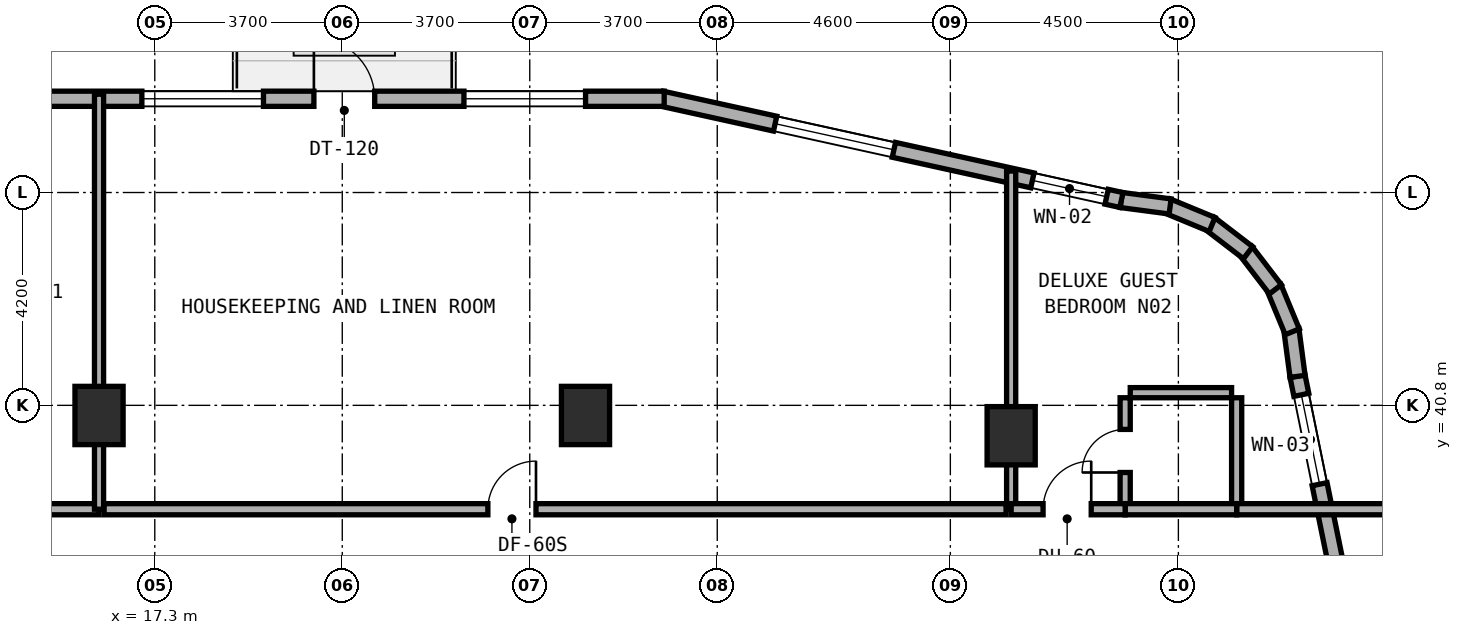
"""IFC4 building model, lengths in metres.
Left out: names, types, materials, properties, quantities, classifications, styles, units other than length and angle.
Written with IfcOpenShell. Run it as: python <this file> out.ifc"""

import sys

from ifc_helpers import new_model, si_unit, direction, frame, frame_2d, origin, origin_2d, place, context, subcontext, project, spatial, rectangle, extrude, element, fill, save


model = new_model("IFC4")
c1 = context("Model", 3, precision=1e-05, world=origin(), true_north=direction((0.0, 1.0)))
c2 = subcontext(c1, "Body", "Model", "MODEL_VIEW")
j1 = project(units=[si_unit("LENGTHUNIT", "METRE"), si_unit("PLANEANGLEUNIT", "RADIAN")], contexts=[c1])
p1 = place(None, origin())
s1 = spatial("IfcSite", under=j1, at=p1, CompositionType="ELEMENT")
p2 = place(p1, origin())
s2 = spatial("IfcBuilding", under=s1, at=p2, CompositionType="ELEMENT")
p3 = place(p2, frame((0.0, 0.0, 59.0)))
s3 = spatial("IfcBuildingStorey", under=s2, at=p3, CompositionType="ELEMENT", Elevation=59.0)
for number, where, z_axis, x_axis in (
    (1, (16.2, 40.6, 0.0), (0.0, 0.0, 1.0), (1.0, 0.0, 0.0)),
    (2, (25.8, 40.6, 0.0), (0.0, 0.0, 1.0), (1.0, 0.0, 0.0)),
    (3, (34.2, 40.2, 0.0), (0.0, 0.0, 1.0), (1.0, 0.0, 0.0)),
):
    element("IfcColumn", number, at=place(p3, frame(where, z_axis=z_axis, x_axis=x_axis)), inside=s3, PredefinedType="COLUMN", context=c2, shape_type="SweptSolid", body=[
        extrude(rectangle(XDim=0.95, YDim=1.15, at=origin_2d()), origin(), (0.0, 0.0, 1.0), 3.5),
    ])
p4 = place(p3, frame((41.864, 31.516, 0.0), z_axis=(0.0, 0.0, 1.0), x_axis=(-0.199990901713, 0.979797754249, 0.0)))
e4 = element("IfcWall", 4, at=p4, inside=s3, PredefinedType="STANDARD", context=c2, shape_type="SweptSolid", body=[
    extrude(rectangle(XDim=10.065, YDim=0.3, at=frame_2d((5.033, 0.0))), origin(), (0.0, 0.0, 1.0), 3.22),
])
p5 = place(p4, frame((2.429, 0.0, 0.8)))
e5 = element("IfcOpeningElement", 5, at=p5, cuts=e4, PredefinedType="OPENING", context=c2, shape_type="SweptSolid", body=[
    extrude(rectangle(XDim=2.4, YDim=1.6, at=frame_2d((1.2, 0.8))), frame((0.0, 0.16, 0.0), z_axis=(0.0, -1.0, 0.0), x_axis=(1.0, 0.0, 0.0)), (0.0, 0.0, 1.0), 0.32),
])
p6 = place(p4, frame((7.887, 0.0, 0.85)))
e6 = element("IfcOpeningElement", 6, at=p6, cuts=e4, PredefinedType="OPENING", context=c2, shape_type="SweptSolid", body=[
    extrude(rectangle(XDim=1.8, YDim=1.5, at=frame_2d((0.9, 0.75))), frame((0.0, 0.16, 0.0), z_axis=(0.0, -1.0, 0.0), x_axis=(1.0, 0.0, 0.0)), (0.0, 0.0, 1.0), 0.32),
])
p7 = place(p3, frame((39.852, 41.372, 0.0), z_axis=(0.0, 0.0, 1.0), x_axis=(-0.131174864804, 0.991359246108, 0.0)))
e7 = element("IfcWall", 7, at=p7, inside=s3, PredefinedType="STANDARD", context=c2, shape_type="SweptSolid", body=[
    extrude(rectangle(XDim=0.938, YDim=0.3, at=frame_2d((0.469, 0.0))), origin(), (0.0, 0.0, 1.0), 3.22),
])
p8 = place(p3, frame((39.748, 42.252, 0.0), z_axis=(0.0, 0.0, 1.0), x_axis=(-0.382344263057, 0.924019948111, 0.0)))
e8 = element("IfcWall", 8, at=p8, inside=s3, PredefinedType="STANDARD", context=c2, shape_type="SweptSolid", body=[
    extrude(rectangle(XDim=0.955, YDim=0.3, at=frame_2d((0.477, 0.0))), origin(), (0.0, 0.0, 1.0), 3.22),
])
p9 = place(p3, frame((39.414, 43.089, 0.0), z_axis=(0.0, 0.0, 1.0), x_axis=(-0.608474481025, 0.793573440799, 0.0)))
e9 = element("IfcWall", 9, at=p9, inside=s3, PredefinedType="STANDARD", context=c2, shape_type="SweptSolid", body=[
    extrude(rectangle(XDim=0.955, YDim=0.3, at=frame_2d((0.478, 0.0))), origin(), (0.0, 0.0, 1.0), 3.22),
])
p10 = place(p3, frame((38.875, 43.812, 0.0), z_axis=(0.0, 0.0, 1.0), x_axis=(-0.793668068435, 0.608351047625, 0.0)))
e10 = element("IfcWall", 10, at=p10, inside=s3, PredefinedType="STANDARD", context=c2, shape_type="SweptSolid", body=[
    extrude(rectangle(XDim=0.955, YDim=0.3, at=frame_2d((0.478, 0.0))), origin(), (0.0, 0.0, 1.0), 3.22),
])
p11 = place(p3, frame((38.166, 44.369, 0.0), z_axis=(0.0, 0.0, 1.0), x_axis=(-0.924019948111, 0.382344263057, 0.0)))
e11 = element("IfcWall", 11, at=p11, inside=s3, PredefinedType="STANDARD", context=c2, shape_type="SweptSolid", body=[
    extrude(rectangle(XDim=0.955, YDim=0.3, at=frame_2d((0.477, 0.0))), origin(), (0.0, 0.0, 1.0), 3.22),
])
p12 = place(p3, frame((37.337, 44.725, 0.0), z_axis=(0.0, 0.0, 1.0), x_axis=(-0.991454295543, 0.130454512571, 0.0)))
e12 = element("IfcWall", 12, at=p12, inside=s3, PredefinedType="STANDARD", context=c2, shape_type="SweptSolid", body=[
    extrude(rectangle(XDim=0.973, YDim=0.3, at=frame_2d((0.487, 0.0))), origin(), (0.0, 0.0, 1.0), 3.22),
])
p13 = place(p3, frame((36.376, 44.852, 0.0), z_axis=(0.0, 0.0, 1.0), x_axis=(-0.976540764801, 0.215332614068, 0.0)))
e13 = element("IfcWall", 13, at=p13, inside=s3, PredefinedType="STANDARD", context=c2, shape_type="SweptSolid", body=[
    extrude(rectangle(XDim=9.288, YDim=0.3, at=frame_2d((4.644, 0.0))), origin(), (0.0, 0.0, 1.0), 3.22),
])
p14 = place(p13, frame((0.299, 0.0, 0.85)))
e14 = element("IfcOpeningElement", 14, at=p14, cuts=e13, PredefinedType="OPENING", context=c2, shape_type="SweptSolid", body=[
    extrude(rectangle(XDim=1.5, YDim=1.5, at=frame_2d((0.75, 0.75))), frame((0.0, 0.16, 0.0), z_axis=(0.0, -1.0, 0.0), x_axis=(1.0, 0.0, 0.0)), (0.0, 0.0, 1.0), 0.32),
])
p15 = place(p13, frame((4.598, 0.0, 0.8)))
e15 = element("IfcOpeningElement", 15, at=p15, cuts=e13, PredefinedType="OPENING", context=c2, shape_type="SweptSolid", body=[
    extrude(rectangle(XDim=2.4, YDim=1.6, at=frame_2d((1.2, 0.8))), frame((0.0, 0.16, 0.0), z_axis=(0.0, -1.0, 0.0), x_axis=(1.0, 0.0, 0.0)), (0.0, 0.0, 1.0), 0.32),
])
p16 = place(p3, frame((27.353, 46.85, 0.0), z_axis=(0.0, 0.0, 1.0), x_axis=(-1.0, 0.0, 0.0)))
e16 = element("IfcWall", 16, at=p16, inside=s3, PredefinedType="STANDARD", context=c2, shape_type="SweptSolid", body=[
    extrude(rectangle(XDim=12.591, YDim=0.3, at=frame_2d((6.295, 0.0))), origin(), (0.0, 0.0, 1.0), 3.22),
])
p17 = place(p16, frame((5.713, 0.0, 0.0)))
e17 = element("IfcOpeningElement", 17, at=p17, cuts=e16, PredefinedType="OPENING", context=c2, shape_type="SweptSolid", body=[
    extrude(rectangle(XDim=1.2, YDim=2.15, at=frame_2d((0.6, 1.075))), frame((0.0, 0.16, 0.0), z_axis=(0.0, -1.0, 0.0), x_axis=(1.0, 0.0, 0.0)), (0.0, 0.0, 1.0), 0.32),
])
p18 = place(p16, frame((1.552, 0.0, 0.8)))
e18 = element("IfcOpeningElement", 18, at=p18, cuts=e16, PredefinedType="OPENING", context=c2, shape_type="SweptSolid", body=[
    extrude(rectangle(XDim=2.4, YDim=1.6, at=frame_2d((1.2, 0.8))), frame((0.0, 0.16, 0.0), z_axis=(0.0, -1.0, 0.0), x_axis=(1.0, 0.0, 0.0)), (0.0, 0.0, 1.0), 0.32),
])
p19 = place(p16, frame((7.908, 0.0, 0.8)))
e19 = element("IfcOpeningElement", 19, at=p19, cuts=e16, PredefinedType="OPENING", context=c2, shape_type="SweptSolid", body=[
    extrude(rectangle(XDim=2.4, YDim=1.6, at=frame_2d((1.2, 0.8))), frame((0.0, 0.16, 0.0), z_axis=(0.0, -1.0, 0.0), x_axis=(1.0, 0.0, 0.0)), (0.0, 0.0, 1.0), 0.32),
])
p20 = place(p3, frame((5.55, 38.75, 0.0), z_axis=(0.0, 0.0, 1.0), x_axis=(1.0, 0.0, 0.0)))
e20 = element("IfcWall", 20, at=p20, inside=s3, PredefinedType="SOLIDWALL", context=c2, shape_type="SweptSolid", body=[
    extrude(rectangle(XDim=10.65, YDim=0.22, at=frame_2d((5.325, 0.0))), origin(), (0.0, 0.0, 1.0), 2.495),
])
p21 = place(p20, frame((4.85, 0.0, 0.0)))
e21 = element("IfcOpeningElement", 21, at=p21, cuts=e20, PredefinedType="OPENING", context=c2, shape_type="SweptSolid", body=[
    extrude(rectangle(XDim=0.95, YDim=2.1, at=frame_2d((0.475, 1.05))), frame((0.0, 0.12, 0.0), z_axis=(0.0, -1.0, 0.0), x_axis=(1.0, 0.0, 0.0)), (0.0, 0.0, 1.0), 0.24),
])
p22 = place(p3, frame((16.2, 38.75, 0.0), z_axis=(0.0, 0.0, 1.0), x_axis=(0.0, 1.0, 0.0)))
e22 = element("IfcWall", 22, at=p22, inside=s3, PredefinedType="SOLIDWALL", context=c2, shape_type="SweptSolid", body=[
    extrude(rectangle(XDim=8.19, YDim=0.18, at=frame_2d((4.095, 0.0))), origin(), (0.0, 0.0, 1.0), 2.495),
])
p23 = place(p3, frame((16.3, 38.75, 0.0), z_axis=(0.0, 0.0, 1.0), x_axis=(1.0, 0.0, 0.0)))
e23 = element("IfcWall", 23, at=p23, inside=s3, PredefinedType="SOLIDWALL", context=c2, shape_type="SweptSolid", body=[
    extrude(rectangle(XDim=17.8, YDim=0.22, at=frame_2d((8.9, 0.0))), origin(), (0.0, 0.0, 1.0), 2.495),
])
p24 = place(p23, frame((7.573, 0.0, 0.0)))
e24 = element("IfcOpeningElement", 24, at=p24, cuts=e23, PredefinedType="OPENING", context=c2, shape_type="SweptSolid", body=[
    extrude(rectangle(XDim=0.95, YDim=2.1, at=frame_2d((0.475, 1.05))), frame((0.0, 0.12, 0.0), z_axis=(0.0, -1.0, 0.0), x_axis=(1.0, 0.0, 0.0)), (0.0, 0.0, 1.0), 0.24),
])
p25 = place(p3, frame((34.2, 38.75, 0.0), z_axis=(0.0, 0.0, 1.0), x_axis=(0.0, 1.0, 0.0)))
e25 = element("IfcWall", 25, at=p25, inside=s3, PredefinedType="SOLIDWALL", context=c2, shape_type="SweptSolid", body=[
    extrude(rectangle(XDim=6.674, YDim=0.18, at=frame_2d((3.337, 0.0))), origin(), (0.0, 0.0, 1.0), 2.495),
])
p26 = place(p3, frame((36.45, 38.85, 0.0), z_axis=(0.0, 0.0, 1.0), x_axis=(0.0, 1.0, 0.0)))
e26 = element("IfcWall", 26, at=p26, inside=s3, PredefinedType="PLUMBINGWALL", context=c2, shape_type="SweptSolid", body=[
    extrude(rectangle(XDim=2.1, YDim=0.2, at=frame_2d((1.05, 0.0))), origin(), (0.0, 0.0, 1.0), 3.22),
])
p27 = place(p26, frame((0.625, 0.0, 0.0)))
e27 = element("IfcOpeningElement", 27, at=p27, cuts=e26, PredefinedType="OPENING", context=c2, shape_type="SweptSolid", body=[
    extrude(rectangle(XDim=0.85, YDim=2.1, at=frame_2d((0.425, 1.05))), frame((0.0, 0.11, 0.0), z_axis=(0.0, -1.0, 0.0), x_axis=(1.0, 0.0, 0.0)), (0.0, 0.0, 1.0), 0.22),
])
p28 = place(p3, frame((36.55, 41.05, 0.0), z_axis=(0.0, 0.0, 1.0), x_axis=(1.0, 0.0, 0.0)))
e28 = element("IfcWall", 28, at=p28, inside=s3, PredefinedType="PLUMBINGWALL", context=c2, shape_type="SweptSolid", body=[
    extrude(rectangle(XDim=2.0, YDim=0.2, at=frame_2d((1.0, 0.0))), origin(), (0.0, 0.0, 1.0), 3.22),
])
p29 = place(p3, frame((38.65, 38.85, 0.0), z_axis=(0.0, 0.0, 1.0), x_axis=(0.0, 1.0, 0.0)))
e29 = element("IfcWall", 29, at=p29, inside=s3, PredefinedType="PLUMBINGWALL", context=c2, shape_type="SweptSolid", body=[
    extrude(rectangle(XDim=2.1, YDim=0.2, at=frame_2d((1.05, 0.0))), origin(), (0.0, 0.0, 1.0), 3.22),
])
p30 = place(p3, frame((38.65, 38.75, 0.0), z_axis=(0.0, 0.0, 1.0), x_axis=(1.0, 0.0, 0.0)))
e30 = element("IfcWall", 30, at=p30, inside=s3, PredefinedType="SOLIDWALL", context=c2, shape_type="SweptSolid", body=[
    extrude(rectangle(XDim=3.19, YDim=0.22, at=frame_2d((1.595, 0.0))), origin(), (0.0, 0.0, 1.0), 3.22),
])
p31 = place(p3, frame((36.45, 38.75, 0.0), z_axis=(0.0, 0.0, 1.0), x_axis=(1.0, 0.0, 0.0)))
e31 = element("IfcWall", 31, at=p31, inside=s3, PredefinedType="SOLIDWALL", context=c2, shape_type="SweptSolid", body=[
    extrude(rectangle(XDim=2.2, YDim=0.22, at=frame_2d((1.1, 0.0))), origin(), (0.0, 0.0, 1.0), 3.22),
])
p32 = place(p3, frame((34.2, 38.75, 0.0), z_axis=(0.0, 0.0, 1.0), x_axis=(1.0, 0.0, 0.0)))
e32 = element("IfcWall", 32, at=p32, inside=s3, PredefinedType="SOLIDWALL", context=c2, shape_type="SweptSolid", body=[
    extrude(rectangle(XDim=2.25, YDim=0.22, at=frame_2d((1.125, 0.0))), origin(), (0.0, 0.0, 1.0), 2.495),
])
p33 = place(p32, frame((0.63, 0.0, 0.0)))
e33 = element("IfcOpeningElement", 33, at=p33, cuts=e32, PredefinedType="OPENING", context=c2, shape_type="SweptSolid", body=[
    extrude(rectangle(XDim=0.95, YDim=2.1, at=frame_2d((0.475, 1.05))), frame((0.0, 0.12, 0.0), z_axis=(0.0, -1.0, 0.0), x_axis=(1.0, 0.0, 0.0)), (0.0, 0.0, 1.0), 0.24),
])
p34 = place(p6, origin())
e34 = element("IfcWindow", 34, at=p34, inside=s3, PartitioningType="SINGLE_PANEL", PredefinedType="WINDOW", context=c2, shape_type="SweptSolid", body=[
    extrude(rectangle(XDim=1.8, YDim=1.5, at=frame_2d((0.9, 0.75))), frame((0.0, 0.03, 0.0), z_axis=(0.0, -1.0, 0.0), x_axis=(1.0, 0.0, 0.0)), (0.0, 0.0, 1.0), 0.06),
])
fill(e6, e34)
p35 = place(p14, origin())
e35 = element("IfcWindow", 35, at=p35, inside=s3, PartitioningType="SINGLE_PANEL", PredefinedType="WINDOW", context=c2, shape_type="SweptSolid", body=[
    extrude(rectangle(XDim=1.5, YDim=1.5, at=frame_2d((0.75, 0.75))), frame((0.0, 0.03, 0.0), z_axis=(0.0, -1.0, 0.0), x_axis=(1.0, 0.0, 0.0)), (0.0, 0.0, 1.0), 0.06),
])
fill(e14, e35)
p36 = place(p15, origin())
e36 = element("IfcWindow", 36, at=p36, inside=s3, PartitioningType="SINGLE_PANEL", PredefinedType="WINDOW", context=c2, shape_type="SweptSolid", body=[
    extrude(rectangle(XDim=2.4, YDim=1.6, at=frame_2d((1.2, 0.8))), frame((0.0, 0.03, 0.0), z_axis=(0.0, -1.0, 0.0), x_axis=(1.0, 0.0, 0.0)), (0.0, 0.0, 1.0), 0.06),
])
fill(e15, e36)
p37 = place(p17, frame((1.2, 0.0, 0.0), z_axis=(0.0, 0.0, 1.0), x_axis=(-1.0, 0.0, 0.0)))
e37 = element("IfcDoor", 37, at=p37, inside=s3, OperationType="SINGLE_SWING_LEFT", PredefinedType="DOOR", context=c2, shape_type="SweptSolid", body=[
    extrude(rectangle(XDim=1.2, YDim=2.15, at=frame_2d((0.6, 1.075))), frame((0.0, 0.025, 0.0), z_axis=(0.0, -1.0, 0.0), x_axis=(1.0, 0.0, 0.0)), (0.0, 0.0, 1.0), 0.05),
])
fill(e17, e37)
p38 = place(p18, origin())
e38 = element("IfcWindow", 38, at=p38, inside=s3, PartitioningType="SINGLE_PANEL", PredefinedType="WINDOW", context=c2, shape_type="SweptSolid", body=[
    extrude(rectangle(XDim=2.4, YDim=1.6, at=frame_2d((1.2, 0.8))), frame((0.0, 0.03, 0.0), z_axis=(0.0, -1.0, 0.0), x_axis=(1.0, 0.0, 0.0)), (0.0, 0.0, 1.0), 0.06),
])
fill(e18, e38)
p39 = place(p19, origin())
e39 = element("IfcWindow", 39, at=p39, inside=s3, PartitioningType="SINGLE_PANEL", PredefinedType="WINDOW", context=c2, shape_type="SweptSolid", body=[
    extrude(rectangle(XDim=2.4, YDim=1.6, at=frame_2d((1.2, 0.8))), frame((0.0, 0.03, 0.0), z_axis=(0.0, -1.0, 0.0), x_axis=(1.0, 0.0, 0.0)), (0.0, 0.0, 1.0), 0.06),
])
fill(e19, e39)
p40 = place(p24, origin())
e40 = element("IfcDoor", 40, at=p40, inside=s3, OperationType="SINGLE_SWING_RIGHT", PredefinedType="DOOR", context=c2, shape_type="SweptSolid", body=[
    extrude(rectangle(XDim=0.95, YDim=2.1, at=frame_2d((0.475, 1.05))), frame((0.0, 0.025, 0.0), z_axis=(0.0, -1.0, 0.0), x_axis=(1.0, 0.0, 0.0)), (0.0, 0.0, 1.0), 0.05),
])
fill(e24, e40)
p41 = place(p27, origin())
e41 = element("IfcDoor", 41, at=p41, inside=s3, OperationType="SINGLE_SWING_LEFT", PredefinedType="DOOR", context=c2, shape_type="SweptSolid", body=[
    extrude(rectangle(XDim=0.85, YDim=2.1, at=frame_2d((0.425, 1.05))), frame((0.0, 0.025, 0.0), z_axis=(0.0, -1.0, 0.0), x_axis=(1.0, 0.0, 0.0)), (0.0, 0.0, 1.0), 0.05),
])
fill(e27, e41)
p42 = place(p33, origin())
e42 = element("IfcDoor", 42, at=p42, inside=s3, OperationType="SINGLE_SWING_RIGHT", PredefinedType="DOOR", context=c2, shape_type="SweptSolid", body=[
    extrude(rectangle(XDim=0.95, YDim=2.1, at=frame_2d((0.475, 1.05))), frame((0.0, 0.025, 0.0), z_axis=(0.0, -1.0, 0.0), x_axis=(1.0, 0.0, 0.0)), (0.0, 0.0, 1.0), 0.05),
])
fill(e33, e42)
save(model, sys.argv[1])
